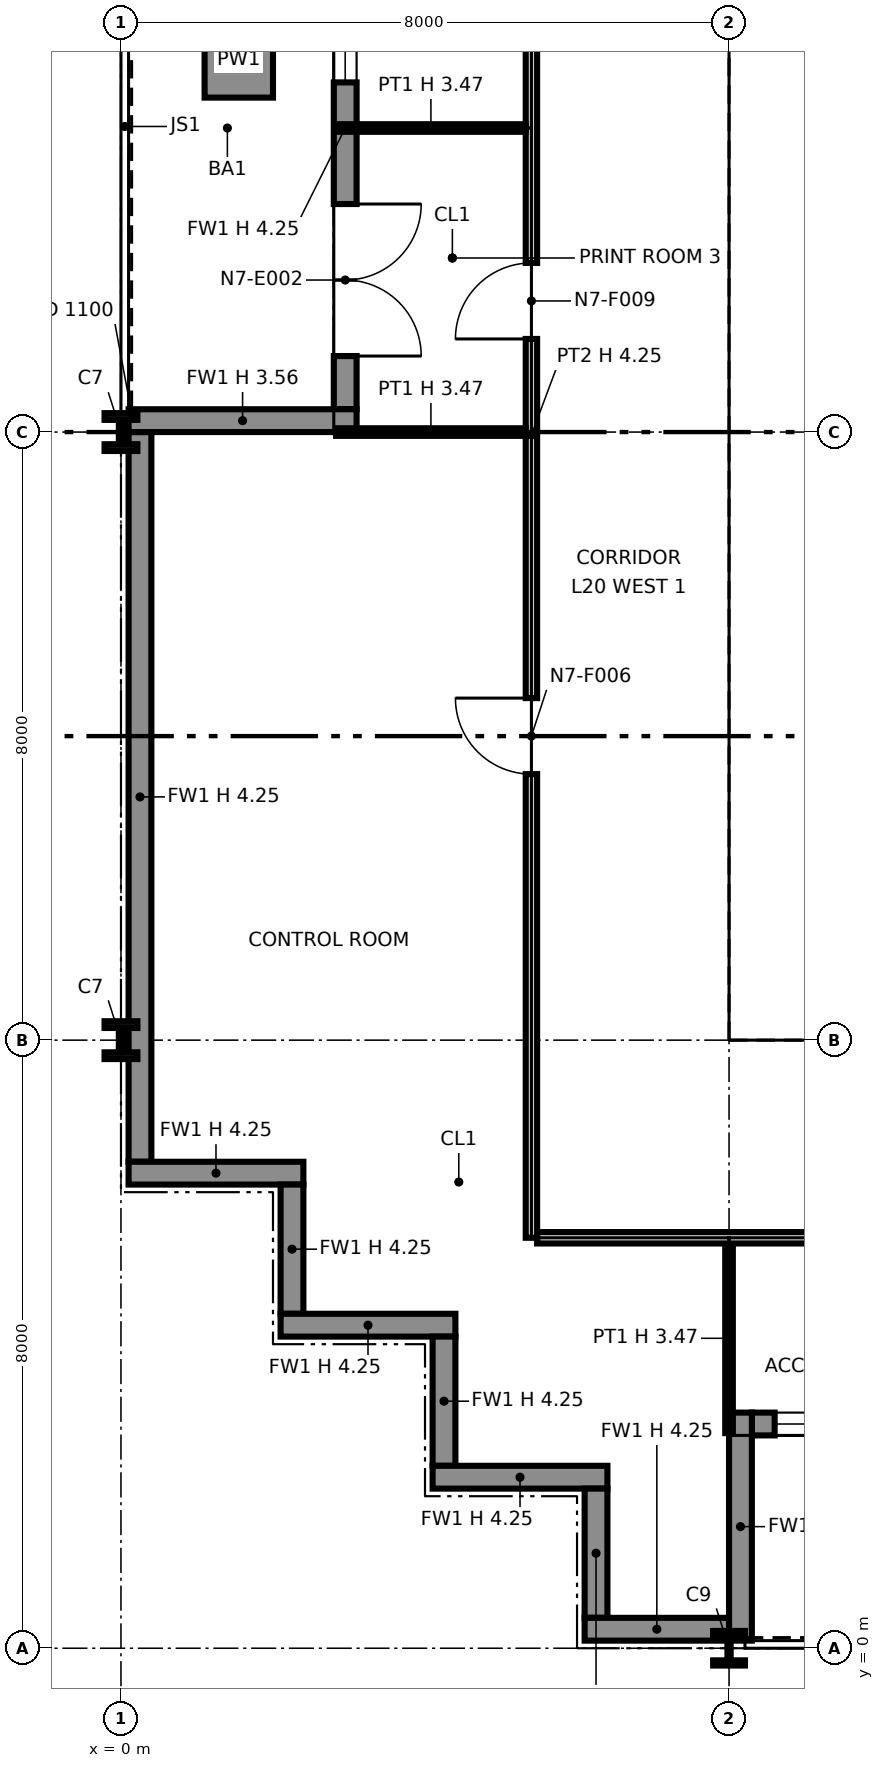
"""IFC4 building model, lengths in metres.
Left out: names, types, materials, properties, quantities, classifications, styles, units other than length and angle.
Written with IfcOpenShell. Run it as: python <this file> out.ifc"""

import sys

from ifc_helpers import new_model, si_unit, direction, frame, frame_2d, origin, origin_2d, place, context, subcontext, project, spatial, polyline, rectangle, i_section, outline, extrude, element, fill, save


model = new_model("IFC4")
c1 = context("Model", 3, precision=1e-05, world=origin(), true_north=direction((0.0, 1.0)))
c2 = subcontext(c1, "Body", "Model", "MODEL_VIEW")
j1 = project(units=[si_unit("LENGTHUNIT", "METRE"), si_unit("PLANEANGLEUNIT", "RADIAN")], contexts=[c1])
p1 = place(None, origin())
s1 = spatial("IfcSite", under=j1, at=p1, CompositionType="ELEMENT")
p2 = place(p1, origin())
s2 = spatial("IfcBuilding", under=s1, at=p2, CompositionType="ELEMENT")
p3 = place(p2, frame((0.0, 0.0, 105.2)))
s3 = spatial("IfcBuildingStorey", under=s2, at=p3, CompositionType="ELEMENT", Elevation=105.2)
for number, where, z_axis, x_axis in (
    (1, (0.0, 8.0, 0.0), (0.0, 0.0, 1.0), (1.0, 0.0, 0.0)),
    (2, (0.0, 16.0, 0.0), (0.0, 0.0, 1.0), (1.0, 0.0, 0.0)),
):
    element("IfcColumn", number, at=place(p3, frame(where, z_axis=z_axis, x_axis=x_axis)), inside=s3, PredefinedType="COLUMN", context=c2, shape_type="SweptSolid", body=[
        extrude(i_section(OverallWidth=0.432, OverallDepth=0.498, WebThickness=0.056, FlangeThickness=0.089, at=origin_2d()), origin(), (0.0, 0.0, 1.0), 4.25),
    ])
p4 = place(p3, frame((8.0, 0.0, 0.0), z_axis=(0.0, 0.0, 1.0), x_axis=(1.0, 0.0, 0.0)))
e3 = element("IfcColumn", 3, at=p4, inside=s3, PredefinedType="COLUMN", context=c2, shape_type="SweptSolid", body=[
    extrude(i_section(OverallWidth=0.419, OverallDepth=0.455, WebThickness=0.042, FlangeThickness=0.068, at=origin_2d()), origin(), (0.0, 0.0, 1.0), 4.25),
])
for number, where, z_axis, x_axis in (
    (4, (8.0, 8.0, 0.0), (0.0, 0.0, 1.0), (1.0, 0.0, 0.0)),
    (5, (8.0, 16.0, 0.0), (0.0, 0.0, 1.0), (1.0, 0.0, 0.0)),
):
    element("IfcColumn", number, at=place(p3, frame(where, z_axis=z_axis, x_axis=x_axis)), inside=s3, PredefinedType="COLUMN", context=c2, shape_type="SweptSolid", body=[
        extrude(i_section(OverallWidth=0.406, OverallDepth=0.417, WebThickness=0.03, FlangeThickness=0.048, at=origin_2d()), origin(), (0.0, 0.0, 1.0), 4.25),
    ])
p5 = place(p3, frame((2.95, 23.7, 0.0), z_axis=(0.0, 0.0, 1.0), x_axis=(0.0, -1.0, 0.0)))
e6 = element("IfcWall", 6, at=p5, inside=s3, PredefinedType="SOLIDWALL", context=c2, shape_type="SweptSolid", body=[
    extrude(rectangle(XDim=7.4, YDim=0.3, at=frame_2d((3.7, 0.0))), origin(), (0.0, 0.0, 1.0), 4.25),
])
p6 = place(p5, frame((0.3, 0.0, 0.9)))
e7 = element("IfcOpeningElement", 7, at=p6, cuts=e6, PredefinedType="OPENING", context=c2, shape_type="SweptSolid", body=[
    extrude(rectangle(XDim=2.8, YDim=2.2, at=frame_2d((1.4, 1.1))), frame((0.0, 0.16, 0.0), z_axis=(0.0, -1.0, 0.0), x_axis=(1.0, 0.0, 0.0)), (0.0, 0.0, 1.0), 0.32),
])
p7 = place(p5, frame((4.7, 0.0, 0.0)))
e8 = element("IfcOpeningElement", 8, at=p7, cuts=e6, PredefinedType="OPENING", context=c2, shape_type="SweptSolid", body=[
    extrude(rectangle(XDim=2.0, YDim=2.4, at=frame_2d((1.0, 1.2))), frame((0.0, 0.16, 0.0), z_axis=(0.0, -1.0, 0.0), x_axis=(1.0, 0.0, 0.0)), (0.0, 0.0, 1.0), 0.32),
])
p8 = place(p3, frame((0.1, 16.15, 0.0), z_axis=(0.0, 0.0, 1.0), x_axis=(1.0, 0.0, 0.0)))
e9 = element("IfcWall", 9, at=p8, inside=s3, PredefinedType="SOLIDWALL", context=c2, shape_type="SweptSolid", body=[
    extrude(rectangle(XDim=3.0, YDim=0.3, at=frame_2d((1.5, 0.0))), origin(), (0.0, 0.0, 1.0), 3.556),
])
p9 = place(p3, frame((0.25, 16.0, 0.0), z_axis=(0.0, 0.0, 1.0), x_axis=(0.0, -1.0, 0.0)))
e10 = element("IfcWall", 10, at=p9, inside=s3, PredefinedType="SOLIDWALL", context=c2, shape_type="SweptSolid", body=[
    extrude(rectangle(XDim=9.6, YDim=0.3, at=frame_2d((4.8, 0.0))), origin(), (0.0, 0.0, 1.0), 4.25),
])
p10 = place(p3, frame((1.55, 23.6, 0.0), z_axis=(0.0, 0.0, 1.0), x_axis=(0.0, -1.0, 0.0)))
e11 = element("IfcWall", 11, at=p10, inside=s3, PredefinedType="SOLIDWALL", context=c2, shape_type="SweptSolid", body=[
    extrude(rectangle(XDim=3.2, YDim=0.9, at=frame_2d((1.6, 0.0))), origin(), (0.0, 0.0, 1.0), 0.6),
])
p11 = place(p3, frame((0.1, 6.25, 0.0), z_axis=(0.0, 0.0, 1.0), x_axis=(1.0, 0.0, 0.0)))
e12 = element("IfcWall", 12, at=p11, inside=s3, PredefinedType="SOLIDWALL", context=c2, shape_type="SweptSolid", body=[
    extrude(rectangle(XDim=2.3, YDim=0.3, at=frame_2d((1.15, 0.0))), origin(), (0.0, 0.0, 1.0), 4.25),
])
p12 = place(p3, frame((2.25, 6.1, 0.0), z_axis=(0.0, 0.0, 1.0), x_axis=(0.0, -1.0, 0.0)))
e13 = element("IfcWall", 13, at=p12, inside=s3, PredefinedType="SOLIDWALL", context=c2, shape_type="SweptSolid", body=[
    extrude(rectangle(XDim=1.7, YDim=0.3, at=frame_2d((0.85, 0.0))), origin(), (0.0, 0.0, 1.0), 4.25),
])
p13 = place(p3, frame((2.1, 4.25, 0.0), z_axis=(0.0, 0.0, 1.0), x_axis=(1.0, 0.0, 0.0)))
e14 = element("IfcWall", 14, at=p13, inside=s3, PredefinedType="SOLIDWALL", context=c2, shape_type="SweptSolid", body=[
    extrude(rectangle(XDim=2.3, YDim=0.3, at=frame_2d((1.15, 0.0))), origin(), (0.0, 0.0, 1.0), 4.25),
])
p14 = place(p3, frame((4.25, 4.1, 0.0), z_axis=(0.0, 0.0, 1.0), x_axis=(0.0, -1.0, 0.0)))
e15 = element("IfcWall", 15, at=p14, inside=s3, PredefinedType="SOLIDWALL", context=c2, shape_type="SweptSolid", body=[
    extrude(rectangle(XDim=1.7, YDim=0.3, at=frame_2d((0.85, 0.0))), origin(), (0.0, 0.0, 1.0), 4.25),
])
p15 = place(p3, frame((4.1, 2.25, 0.0), z_axis=(0.0, 0.0, 1.0), x_axis=(1.0, 0.0, 0.0)))
e16 = element("IfcWall", 16, at=p15, inside=s3, PredefinedType="SOLIDWALL", context=c2, shape_type="SweptSolid", body=[
    extrude(rectangle(XDim=2.3, YDim=0.3, at=frame_2d((1.15, 0.0))), origin(), (0.0, 0.0, 1.0), 4.25),
])
p16 = place(p3, frame((6.25, 2.1, 0.0), z_axis=(0.0, 0.0, 1.0), x_axis=(0.0, -1.0, 0.0)))
e17 = element("IfcWall", 17, at=p16, inside=s3, PredefinedType="SOLIDWALL", context=c2, shape_type="SweptSolid", body=[
    extrude(rectangle(XDim=1.7, YDim=0.3, at=frame_2d((0.85, 0.0))), origin(), (0.0, 0.0, 1.0), 4.25),
])
p17 = place(p3, frame((6.1, 0.25, 0.0), z_axis=(0.0, 0.0, 1.0), x_axis=(1.0, 0.0, 0.0)))
e18 = element("IfcWall", 18, at=p17, inside=s3, PredefinedType="SOLIDWALL", context=c2, shape_type="SweptSolid", body=[
    extrude(rectangle(XDim=1.9, YDim=0.3, at=frame_2d((0.95, 0.0))), origin(), (0.0, 0.0, 1.0), 4.25),
])
p18 = place(p3, frame((8.3, 2.95, 0.0), z_axis=(0.0, 0.0, 1.0), x_axis=(1.0, 0.0, 0.0)))
e19 = element("IfcWall", 19, at=p18, inside=s3, PredefinedType="SOLIDWALL", context=c2, shape_type="SweptSolid", body=[
    extrude(rectangle(XDim=7.4, YDim=0.3, at=frame_2d((3.7, 0.0))), origin(), (0.0, 0.0, 1.0), 4.25),
])
p19 = place(p18, frame((0.3, 0.0, 0.9)))
e20 = element("IfcOpeningElement", 20, at=p19, cuts=e19, PredefinedType="OPENING", context=c2, shape_type="SweptSolid", body=[
    extrude(rectangle(XDim=2.8, YDim=2.2, at=frame_2d((1.4, 1.1))), frame((0.0, 0.16, 0.0), z_axis=(0.0, -1.0, 0.0), x_axis=(1.0, 0.0, 0.0)), (0.0, 0.0, 1.0), 0.32),
])
p20 = place(p18, frame((4.7, 0.0, 0.0)))
e21 = element("IfcOpeningElement", 21, at=p20, cuts=e19, PredefinedType="OPENING", context=c2, shape_type="SweptSolid", body=[
    extrude(rectangle(XDim=2.0, YDim=2.4, at=frame_2d((1.0, 1.2))), frame((0.0, 0.16, 0.0), z_axis=(0.0, -1.0, 0.0), x_axis=(1.0, 0.0, 0.0)), (0.0, 0.0, 1.0), 0.32),
])
p21 = place(p3, frame((8.15, 0.1, 0.0), z_axis=(0.0, 0.0, 1.0), x_axis=(0.0, 1.0, 0.0)))
e22 = element("IfcWall", 22, at=p21, inside=s3, PredefinedType="SOLIDWALL", context=c2, shape_type="SweptSolid", body=[
    extrude(rectangle(XDim=3.0, YDim=0.3, at=frame_2d((1.5, 0.0))), origin(), (0.0, 0.0, 1.0), 3.469),
])
p22 = place(p3, frame((8.65, 8.75, 0.0), z_axis=(0.0, 0.0, 1.0), x_axis=(1.0, 0.0, 0.0)))
e23 = element("IfcWall", 23, at=p22, inside=s3, PredefinedType="PARTITIONING", context=c2, shape_type="SweptSolid", body=[
    extrude(outline(polyline([(0.0, 0.0), (14.7, 0.0), (14.7, 4.25), (7.469, 4.25), (7.469, 3.632), (7.231, 3.632), (7.23, 4.25), (0.0, 4.25), (0.0, 0.0)])), frame((0.0, 0.1, 0.0), z_axis=(0.0, -1.0, 0.0), x_axis=(1.0, 0.0, 0.0)), (0.0, 0.0, 1.0), 0.2),
])
p23 = place(p22, frame((1.3, 0.0, 0.0)))
e24 = element("IfcOpeningElement", 24, at=p23, cuts=e23, PredefinedType="OPENING", context=c2, shape_type="SweptSolid", body=[
    extrude(rectangle(XDim=1.4, YDim=2.1, at=frame_2d((0.7, 1.05))), frame((0.0, 0.11, 0.0), z_axis=(0.0, -1.0, 0.0), x_axis=(1.0, 0.0, 0.0)), (0.0, 0.0, 1.0), 0.22),
])
p24 = place(p22, frame((4.6, 0.0, 0.0)))
e25 = element("IfcOpeningElement", 25, at=p24, cuts=e23, PredefinedType="OPENING", context=c2, shape_type="SweptSolid", body=[
    extrude(rectangle(XDim=1.4, YDim=2.1, at=frame_2d((0.7, 1.05))), frame((0.0, 0.11, 0.0), z_axis=(0.0, -1.0, 0.0), x_axis=(1.0, 0.0, 0.0)), (0.0, 0.0, 1.0), 0.22),
])
p25 = place(p22, frame((10.4, 0.0, 0.0)))
e26 = element("IfcOpeningElement", 26, at=p25, cuts=e23, PredefinedType="OPENING", context=c2, shape_type="SweptSolid", body=[
    extrude(rectangle(XDim=1.2, YDim=2.1, at=frame_2d((0.6, 1.05))), frame((0.0, 0.11, 0.0), z_axis=(0.0, -1.0, 0.0), x_axis=(1.0, 0.0, 0.0)), (0.0, 0.0, 1.0), 0.22),
])
p26 = place(p3, frame((8.75, 8.85, 0.0), z_axis=(0.0, 0.0, 1.0), x_axis=(0.0, 1.0, 0.0)))
e27 = element("IfcWall", 27, at=p26, inside=s3, PredefinedType="PARTITIONING", context=c2, shape_type="SweptSolid", body=[
    extrude(outline(polyline([(0.0, 0.0), (14.3, 0.0), (14.3, 4.25), (10.231, 4.25), (10.23, 3.789), (10.07, 3.789), (10.069, 4.25), (7.27, 4.25), (7.269, 3.632), (7.031, 3.632), (7.031, 4.25), (0.0, 4.25), (0.0, 0.0)])), frame((0.0, 0.1, 0.0), z_axis=(0.0, -1.0, 0.0), x_axis=(1.0, 0.0, 0.0)), (0.0, 0.0, 1.0), 0.2),
])
p27 = place(p26, frame((8.3, 0.0, 0.0)))
e28 = element("IfcOpeningElement", 28, at=p27, cuts=e27, PredefinedType="OPENING", context=c2, shape_type="SweptSolid", body=[
    extrude(rectangle(XDim=1.8, YDim=2.1, at=frame_2d((0.9, 1.05))), frame((0.0, 0.11, 0.0), z_axis=(0.0, -1.0, 0.0), x_axis=(1.0, 0.0, 0.0)), (0.0, 0.0, 1.0), 0.22),
])
p28 = place(p3, frame((8.85, 16.0, 0.0), z_axis=(0.0, 0.0, 1.0), x_axis=(1.0, 0.0, 0.0)))
e29 = element("IfcWall", 29, at=p28, inside=s3, PredefinedType="PARTITIONING", context=c2, shape_type="SweptSolid", body=[
    extrude(rectangle(XDim=6.931, YDim=0.6, at=frame_2d((3.466, 0.0))), origin(), (0.0, 0.0, 1.0), 3.632),
])
p29 = place(p3, frame((8.85, 19.9, 0.0), z_axis=(0.0, 0.0, 1.0), x_axis=(1.0, 0.0, 0.0)))
e30 = element("IfcWall", 30, at=p29, inside=s3, PredefinedType="PARTITIONING", context=c2, shape_type="SweptSolid", body=[
    extrude(outline(polyline([(0.0, 0.0), (14.3, 0.0), (14.3, 3.789), (7.27, 3.789), (7.269, 3.632), (7.031, 3.632), (7.031, 4.25), (0.0, 4.25), (0.0, 0.0)])), frame((0.0, 0.1, 0.0), z_axis=(0.0, -1.0, 0.0), x_axis=(1.0, 0.0, 0.0)), (0.0, 0.0, 1.0), 0.2),
])
p30 = place(p29, frame((6.9, 0.0, 0.0)))
e31 = element("IfcOpeningElement", 31, at=p30, cuts=e30, PredefinedType="OPENING", context=c2, shape_type="SweptSolid", body=[
    extrude(rectangle(XDim=0.9, YDim=2.1, at=frame_2d((0.45, 1.05))), frame((0.0, 0.11, 0.0), z_axis=(0.0, -1.0, 0.0), x_axis=(1.0, 0.0, 0.0)), (0.0, 0.0, 1.0), 0.22),
])
p31 = place(p29, frame((9.95, 0.0, 0.0)))
e32 = element("IfcOpeningElement", 32, at=p31, cuts=e30, PredefinedType="OPENING", context=c2, shape_type="SweptSolid", body=[
    extrude(rectangle(XDim=0.9, YDim=2.1, at=frame_2d((0.45, 1.05))), frame((0.0, 0.11, 0.0), z_axis=(0.0, -1.0, 0.0), x_axis=(1.0, 0.0, 0.0)), (0.0, 0.0, 1.0), 0.22),
])
p32 = place(p29, frame((12.45, 0.0, 0.0)))
e33 = element("IfcOpeningElement", 33, at=p32, cuts=e30, PredefinedType="OPENING", context=c2, shape_type="SweptSolid", body=[
    extrude(rectangle(XDim=0.9, YDim=2.1, at=frame_2d((0.45, 1.05))), frame((0.0, 0.11, 0.0), z_axis=(0.0, -1.0, 0.0), x_axis=(1.0, 0.0, 0.0)), (0.0, 0.0, 1.0), 0.22),
])
p33 = place(p3, frame((8.0, 2.83, 0.0), z_axis=(0.0, 0.0, 1.0), x_axis=(0.0, 1.0, 0.0)))
e34 = element("IfcWall", 34, at=p33, inside=s3, PredefinedType="PARTITIONING", context=c2, shape_type="SweptSolid", body=[
    extrude(rectangle(XDim=2.495, YDim=0.1, at=frame_2d((1.248, 0.0))), origin(), (0.0, 0.0, 1.0), 3.47),
])
p34 = place(p3, frame((5.475, 5.4, 0.0), z_axis=(0.0, 0.0, 1.0), x_axis=(1.0, 0.0, 0.0)))
e35 = element("IfcWall", 35, at=p34, inside=s3, PredefinedType="PARTITIONING", context=c2, shape_type="SweptSolid", body=[
    extrude(rectangle(XDim=21.05, YDim=0.15, at=frame_2d((10.525, 0.0))), origin(), (0.0, 0.0, 1.0), 4.25),
])
p35 = place(p34, frame((13.025, 0.0, 0.0), z_axis=(0.0, 0.0, 1.0), x_axis=(-1.0, 0.0, 0.0)))
e36 = element("IfcOpeningElement", 36, at=p35, cuts=e35, PredefinedType="OPENING", context=c2, shape_type="SweptSolid", body=[
    extrude(rectangle(XDim=1.0, YDim=2.1, at=frame_2d((0.5, 1.05))), frame((0.0, 0.085, 0.0), z_axis=(0.0, -1.0, 0.0), x_axis=(1.0, 0.0, 0.0)), (0.0, 0.0, 1.0), 0.17),
])
p36 = place(p34, frame((17.025, 0.0, 0.0), z_axis=(0.0, 0.0, 1.0), x_axis=(-1.0, 0.0, 0.0)))
e37 = element("IfcOpeningElement", 37, at=p36, cuts=e35, PredefinedType="OPENING", context=c2, shape_type="SweptSolid", body=[
    extrude(rectangle(XDim=1.0, YDim=2.1, at=frame_2d((0.5, 1.05))), frame((0.0, 0.085, 0.0), z_axis=(0.0, -1.0, 0.0), x_axis=(1.0, 0.0, 0.0)), (0.0, 0.0, 1.0), 0.17),
])
p37 = place(p34, frame((5.025, 0.0, 0.0), z_axis=(0.0, 0.0, 1.0), x_axis=(-1.0, 0.0, 0.0)))
e38 = element("IfcOpeningElement", 38, at=p37, cuts=e35, PredefinedType="OPENING", context=c2, shape_type="SweptSolid", body=[
    extrude(rectangle(XDim=1.0, YDim=2.1, at=frame_2d((0.5, 1.05))), frame((0.0, 0.085, 0.0), z_axis=(0.0, -1.0, 0.0), x_axis=(1.0, 0.0, 0.0)), (0.0, 0.0, 1.0), 0.17),
])
p38 = place(p34, frame((9.025, 0.0, 0.0), z_axis=(0.0, 0.0, 1.0), x_axis=(-1.0, 0.0, 0.0)))
e39 = element("IfcOpeningElement", 39, at=p38, cuts=e35, PredefinedType="OPENING", context=c2, shape_type="SweptSolid", body=[
    extrude(rectangle(XDim=1.0, YDim=2.1, at=frame_2d((0.5, 1.05))), frame((0.0, 0.085, 0.0), z_axis=(0.0, -1.0, 0.0), x_axis=(1.0, 0.0, 0.0)), (0.0, 0.0, 1.0), 0.17),
])
p39 = place(p34, frame((18.925, 0.0, 0.0)))
e40 = element("IfcOpeningElement", 40, at=p39, cuts=e35, PredefinedType="OPENING", context=c2, shape_type="SweptSolid", body=[
    extrude(rectangle(XDim=1.8, YDim=2.1, at=frame_2d((0.9, 1.05))), frame((0.0, 0.085, 0.0), z_axis=(0.0, -1.0, 0.0), x_axis=(1.0, 0.0, 0.0)), (0.0, 0.0, 1.0), 0.17),
])
p40 = place(p3, frame((5.4, 5.4, 0.0), z_axis=(0.0, 0.0, 1.0), x_axis=(0.0, 1.0, 0.0)))
e41 = element("IfcWall", 41, at=p40, inside=s3, PredefinedType="PARTITIONING", context=c2, shape_type="SweptSolid", body=[
    extrude(outline(polyline([(0.0, 0.0), (21.125, 0.0), (21.125, 4.25), (18.9, 4.25), (18.898, 3.47), (18.302, 3.47), (18.3, 4.25), (14.9, 4.25), (14.898, 3.47), (14.302, 3.47), (14.3, 4.25), (10.9, 4.25), (10.898, 3.47), (10.302, 3.47), (10.3, 4.25), (6.9, 4.25), (6.898, 3.47), (6.302, 3.47), (6.3, 4.25), (2.9, 4.25), (2.898, 3.47), (2.302, 3.47), (2.3, 4.25), (0.0, 4.25), (0.0, 0.0)])), frame((0.0, 0.075, 0.0), z_axis=(0.0, -1.0, 0.0), x_axis=(1.0, 0.0, 0.0)), (0.0, 0.0, 1.0), 0.15),
])
p41 = place(p40, frame((6.1, 0.0, 0.0)))
e42 = element("IfcOpeningElement", 42, at=p41, cuts=e41, PredefinedType="OPENING", context=c2, shape_type="SweptSolid", body=[
    extrude(rectangle(XDim=1.0, YDim=2.1, at=frame_2d((0.5, 1.05))), frame((0.0, 0.085, 0.0), z_axis=(0.0, -1.0, 0.0), x_axis=(1.0, 0.0, 0.0)), (0.0, 0.0, 1.0), 0.17),
])
p42 = place(p40, frame((11.825, 0.0, 0.0)))
e43 = element("IfcOpeningElement", 43, at=p42, cuts=e41, PredefinedType="OPENING", context=c2, shape_type="SweptSolid", body=[
    extrude(rectangle(XDim=1.0, YDim=2.1, at=frame_2d((0.5, 1.05))), frame((0.0, 0.085, 0.0), z_axis=(0.0, -1.0, 0.0), x_axis=(1.0, 0.0, 0.0)), (0.0, 0.0, 1.0), 0.17),
])
p43 = place(p40, frame((16.1, 0.0, 0.0)))
e44 = element("IfcOpeningElement", 44, at=p43, cuts=e41, PredefinedType="OPENING", context=c2, shape_type="SweptSolid", body=[
    extrude(rectangle(XDim=1.0, YDim=2.1, at=frame_2d((0.5, 1.05))), frame((0.0, 0.085, 0.0), z_axis=(0.0, -1.0, 0.0), x_axis=(1.0, 0.0, 0.0)), (0.0, 0.0, 1.0), 0.17),
])
p44 = place(p40, frame((19.4, 0.0, 0.0)))
e45 = element("IfcOpeningElement", 45, at=p44, cuts=e41, PredefinedType="OPENING", context=c2, shape_type="SweptSolid", body=[
    extrude(rectangle(XDim=1.0, YDim=2.1, at=frame_2d((0.5, 1.05))), frame((0.0, 0.085, 0.0), z_axis=(0.0, -1.0, 0.0), x_axis=(1.0, 0.0, 0.0)), (0.0, 0.0, 1.0), 0.17),
])
for number, where, z_axis, x_axis in (
    (46, (2.83, 16.0, 0.0), (0.0, 0.0, 1.0), (1.0, 0.0, 0.0)),
    (47, (2.83, 20.0, 0.0), (0.0, 0.0, 1.0), (1.0, 0.0, 0.0)),
):
    element("IfcWall", number, at=place(p3, frame(where, z_axis=z_axis, x_axis=x_axis)), inside=s3, PredefinedType="PARTITIONING", context=c2, shape_type="SweptSolid", body=[
        extrude(rectangle(XDim=2.495, YDim=0.1, at=frame_2d((1.248, 0.0))), origin(), (0.0, 0.0, 1.0), 3.47),
    ])
p45 = place(p6, origin())
e48 = element("IfcWindow", 48, at=p45, inside=s3, PartitioningType="SINGLE_PANEL", PredefinedType="WINDOW", context=c2, shape_type="SweptSolid", body=[
    extrude(rectangle(XDim=2.8, YDim=2.2, at=frame_2d((1.4, 1.1))), frame((0.0, 0.03, 0.0), z_axis=(0.0, -1.0, 0.0), x_axis=(1.0, 0.0, 0.0)), (0.0, 0.0, 1.0), 0.06),
])
fill(e7, e48)
p46 = place(p7, origin())
e49 = element("IfcDoor", 49, at=p46, inside=s3, OperationType="DOUBLE_DOOR_SINGLE_SWING", PredefinedType="DOOR", context=c2, shape_type="SweptSolid", body=[
    extrude(rectangle(XDim=2.0, YDim=2.4, at=frame_2d((1.0, 1.2))), frame((0.0, 0.025, 0.0), z_axis=(0.0, -1.0, 0.0), x_axis=(1.0, 0.0, 0.0)), (0.0, 0.0, 1.0), 0.05),
])
fill(e8, e49)
p47 = place(p19, origin())
e50 = element("IfcWindow", 50, at=p47, inside=s3, PartitioningType="SINGLE_PANEL", PredefinedType="WINDOW", context=c2, shape_type="SweptSolid", body=[
    extrude(rectangle(XDim=2.8, YDim=2.2, at=frame_2d((1.4, 1.1))), frame((0.0, 0.03, 0.0), z_axis=(0.0, -1.0, 0.0), x_axis=(1.0, 0.0, 0.0)), (0.0, 0.0, 1.0), 0.06),
])
fill(e20, e50)
p48 = place(p27, origin())
e51 = element("IfcDoor", 51, at=p48, inside=s3, OperationType="DOUBLE_DOOR_SINGLE_SWING", PredefinedType="NOTDEFINED", context=c2, shape_type="SweptSolid", body=[
    extrude(rectangle(XDim=1.8, YDim=2.1, at=frame_2d((0.9, 1.05))), frame((0.0, 0.025, 0.0), z_axis=(0.0, -1.0, 0.0), x_axis=(1.0, 0.0, 0.0)), (0.0, 0.0, 1.0), 0.05),
])
fill(e28, e51)
p49 = place(p41, origin())
e52 = element("IfcDoor", 52, at=p49, inside=s3, OperationType="SINGLE_SWING_RIGHT", PredefinedType="DOOR", context=c2, shape_type="SweptSolid", body=[
    extrude(rectangle(XDim=1.0, YDim=2.1, at=frame_2d((0.5, 1.05))), frame((0.0, 0.025, 0.0), z_axis=(0.0, -1.0, 0.0), x_axis=(1.0, 0.0, 0.0)), (0.0, 0.0, 1.0), 0.05),
])
fill(e42, e52)
p50 = place(p42, origin())
e53 = element("IfcDoor", 53, at=p50, inside=s3, OperationType="SINGLE_SWING_LEFT", PredefinedType="DOOR", context=c2, shape_type="SweptSolid", body=[
    extrude(rectangle(XDim=1.0, YDim=2.1, at=frame_2d((0.5, 1.05))), frame((0.0, 0.025, 0.0), z_axis=(0.0, -1.0, 0.0), x_axis=(1.0, 0.0, 0.0)), (0.0, 0.0, 1.0), 0.05),
])
fill(e43, e53)
save(model, sys.argv[1])
